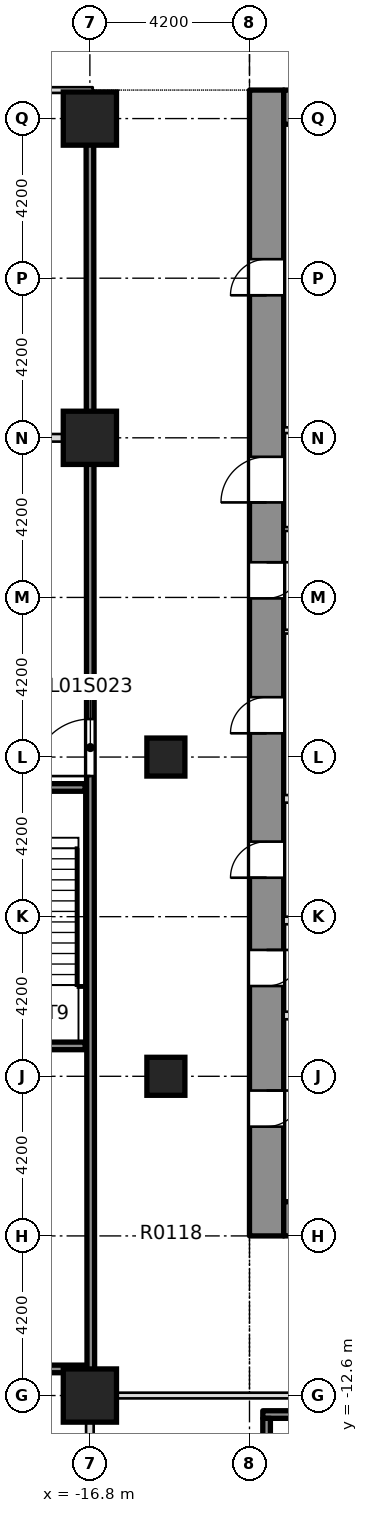
"""IFC4 building model, lengths in metres.
Left out: names, types, materials, properties, quantities, classifications, styles, units other than length and angle.
Written with IfcOpenShell. Run it as: python <this file> out.ifc"""

import sys

from ifc_helpers import new_model, si_unit, direction, frame, frame_2d, origin, origin_2d, place, context, subcontext, project, spatial, rectangle, extrude, element, fill, save


model = new_model("IFC4")
c1 = context("Model", 3, precision=1e-05, world=origin(), true_north=direction((0.0, 1.0)))
c2 = subcontext(c1, "Body", "Model", "MODEL_VIEW")
j1 = project(units=[si_unit("LENGTHUNIT", "METRE"), si_unit("PLANEANGLEUNIT", "RADIAN")], contexts=[c1])
p1 = place(None, origin())
s1 = spatial("IfcSite", under=j1, at=p1, CompositionType="ELEMENT")
p2 = place(p1, origin())
s2 = spatial("IfcBuilding", under=s1, at=p2, CompositionType="ELEMENT")
p3 = place(p2, frame((0.0, 0.0, 7.5)))
s3 = spatial("IfcBuildingStorey", under=s2, at=p3, CompositionType="ELEMENT", Elevation=7.5)
p4 = place(p3, frame((-12.15, -8.4, -0.4), z_axis=(0.0, 0.0, 1.0), x_axis=(0.0, 1.0, 0.0)))
e1 = element("IfcWall", 1, at=p4, inside=s3, PredefinedType="SHEAR", context=c2, shape_type="SweptSolid", body=[
    extrude(rectangle(XDim=30.15, YDim=0.9, at=frame_2d((15.075, 0.0))), origin(), (0.0, 0.0, 1.0), 5.0),
])
p5 = place(p4, frame((2.875, 0.0, 0.4)))
e2 = element("IfcOpeningElement", 2, at=p5, cuts=e1, PredefinedType="OPENING", context=c2, shape_type="SweptSolid", body=[
    extrude(rectangle(XDim=0.95, YDim=2.1, at=frame_2d((0.475, 1.05))), frame((0.0, 0.46, 0.0), z_axis=(0.0, -1.0, 0.0), x_axis=(1.0, 0.0, 0.0)), (0.0, 0.0, 1.0), 0.92),
])
p6 = place(p4, frame((6.575, 0.0, 0.4)))
e3 = element("IfcOpeningElement", 3, at=p6, cuts=e1, PredefinedType="OPENING", context=c2, shape_type="SweptSolid", body=[
    extrude(rectangle(XDim=0.95, YDim=2.1, at=frame_2d((0.475, 1.05))), frame((0.0, 0.46, 0.0), z_axis=(0.0, -1.0, 0.0), x_axis=(1.0, 0.0, 0.0)), (0.0, 0.0, 1.0), 0.92),
])
p7 = place(p4, frame((9.425, 0.0, 0.4)))
e4 = element("IfcOpeningElement", 4, at=p7, cuts=e1, PredefinedType="OPENING", context=c2, shape_type="SweptSolid", body=[
    extrude(rectangle(XDim=0.95, YDim=2.1, at=frame_2d((0.475, 1.05))), frame((0.0, 0.46, 0.0), z_axis=(0.0, -1.0, 0.0), x_axis=(1.0, 0.0, 0.0)), (0.0, 0.0, 1.0), 0.92),
])
p8 = place(p4, frame((13.225, 0.0, 0.4)))
e5 = element("IfcOpeningElement", 5, at=p8, cuts=e1, PredefinedType="OPENING", context=c2, shape_type="SweptSolid", body=[
    extrude(rectangle(XDim=0.95, YDim=2.1, at=frame_2d((0.475, 1.05))), frame((0.0, 0.46, 0.0), z_axis=(0.0, -1.0, 0.0), x_axis=(1.0, 0.0, 0.0)), (0.0, 0.0, 1.0), 0.92),
])
p9 = place(p4, frame((16.775, 0.0, 0.4)))
e6 = element("IfcOpeningElement", 6, at=p9, cuts=e1, PredefinedType="OPENING", context=c2, shape_type="SweptSolid", body=[
    extrude(rectangle(XDim=0.95, YDim=2.1, at=frame_2d((0.475, 1.05))), frame((0.0, 0.46, 0.0), z_axis=(0.0, -1.0, 0.0), x_axis=(1.0, 0.0, 0.0)), (0.0, 0.0, 1.0), 0.92),
])
p10 = place(p4, frame((24.75, 0.0, 0.4)))
e7 = element("IfcOpeningElement", 7, at=p10, cuts=e1, PredefinedType="OPENING", context=c2, shape_type="SweptSolid", body=[
    extrude(rectangle(XDim=0.95, YDim=2.1, at=frame_2d((0.475, 1.05))), frame((0.0, 0.46, 0.0), z_axis=(0.0, -1.0, 0.0), x_axis=(1.0, 0.0, 0.0)), (0.0, 0.0, 1.0), 0.92),
])
p11 = place(p4, frame((19.3, 0.0, 0.4)))
e8 = element("IfcOpeningElement", 8, at=p11, cuts=e1, PredefinedType="OPENING", context=c2, shape_type="SweptSolid", body=[
    extrude(rectangle(XDim=1.2, YDim=2.1, at=frame_2d((0.6, 1.05))), frame((0.0, 0.46, 0.0), z_axis=(0.0, -1.0, 0.0), x_axis=(1.0, 0.0, 0.0)), (0.0, 0.0, 1.0), 0.92),
])
p12 = place(p3, frame((-11.7, -7.95, -0.4), z_axis=(0.0, 0.0, 1.0), x_axis=(1.0, 0.0, 0.0)))
e9 = element("IfcWall", 9, at=p12, inside=s3, PredefinedType="SHEAR", context=c2, shape_type="SweptSolid", body=[
    extrude(rectangle(XDim=23.4, YDim=0.9, at=frame_2d((11.7, 0.0))), origin(), (0.0, 0.0, 1.0), 5.0),
])
p13 = place(p12, frame((6.95, 0.0, 0.4)))
e10 = element("IfcOpeningElement", 10, at=p13, cuts=e9, PredefinedType="OPENING", context=c2, shape_type="SweptSolid", body=[
    extrude(rectangle(XDim=1.8, YDim=2.1, at=frame_2d((0.9, 1.05))), frame((0.0, 0.46, 0.0), z_axis=(0.0, -1.0, 0.0), x_axis=(1.0, 0.0, 0.0)), (0.0, 0.0, 1.0), 0.92),
])
p14 = place(p12, frame((14.65, 0.0, 0.4)))
e11 = element("IfcOpeningElement", 11, at=p14, cuts=e9, PredefinedType="OPENING", context=c2, shape_type="SweptSolid", body=[
    extrude(rectangle(XDim=1.8, YDim=2.1, at=frame_2d((0.9, 1.05))), frame((0.0, 0.46, 0.0), z_axis=(0.0, -1.0, 0.0), x_axis=(1.0, 0.0, 0.0)), (0.0, 0.0, 1.0), 0.92),
])
p15 = place(p3, frame((-11.7, 21.3, -0.4), z_axis=(0.0, 0.0, 1.0), x_axis=(1.0, 0.0, 0.0)))
e12 = element("IfcWall", 12, at=p15, inside=s3, PredefinedType="SOLIDWALL", context=c2, shape_type="SweptSolid", body=[
    extrude(rectangle(XDim=23.4, YDim=0.9, at=frame_2d((11.7, 0.0))), origin(), (0.0, 0.0, 1.0), 5.0),
])
for number, where, z_axis, x_axis in (
    (13, (-16.8, -12.6, -0.4), (0.0, 0.0, 1.0), (1.0, 0.0, 0.0)),
    (14, (-16.8, 12.6, -0.4), (0.0, 0.0, 1.0), (1.0, 0.0, 0.0)),
    (15, (-16.8, 21.0, -0.4), (0.0, 0.0, 1.0), (1.0, 0.0, 0.0)),
):
    element("IfcColumn", number, at=place(p3, frame(where, z_axis=z_axis, x_axis=x_axis)), inside=s3, PredefinedType="COLUMN", context=c2, shape_type="SweptSolid", body=[
        extrude(rectangle(XDim=1.4, YDim=1.4, at=origin_2d()), origin(), (0.0, 0.0, 1.0), 5.0),
    ])
for number, where, z_axis, x_axis in (
    (16, (-14.8, -4.2, -0.4), (0.0, 0.0, 1.0), (1.0, 0.0, 0.0)),
    (17, (-14.8, 4.2, -0.4), (0.0, 0.0, 1.0), (1.0, 0.0, 0.0)),
):
    element("IfcColumn", number, at=place(p3, frame(where, z_axis=z_axis, x_axis=x_axis)), inside=s3, PredefinedType="COLUMN", context=c2, shape_type="SweptSolid", body=[
        extrude(rectangle(XDim=1.0, YDim=1.0, at=origin_2d()), origin(), (0.0, 0.0, 1.0), 5.0),
    ])
p16 = place(p3, frame((-16.9, -12.6, 0.0), z_axis=(0.0, 0.0, 1.0), x_axis=(1.0, 0.0, 0.0)))
e18 = element("IfcWall", 18, at=p16, inside=s3, PredefinedType="PARTITIONING", context=c2, shape_type="SweptSolid", body=[
    extrude(rectangle(XDim=9.625, YDim=0.15, at=frame_2d((4.812, 0.0))), origin(), (0.0, 0.0, 1.0), 4.6),
])
p17 = place(p3, frame((-25.2, -11.9, 0.0), z_axis=(0.0, 0.0, 1.0), x_axis=(1.0, 0.0, 0.0)))
e19 = element("IfcWall", 19, at=p17, inside=s3, PredefinedType="SOLIDWALL", context=c2, shape_type="SweptSolid", body=[
    extrude(rectangle(XDim=8.325, YDim=0.2, at=frame_2d((4.163, 0.0))), origin(), (0.0, 0.0, 1.0), 4.6),
])
p18 = place(p3, frame((-34.15, 21.75, 0.0), z_axis=(0.0, 0.0, 1.0), x_axis=(1.0, 0.0, 0.0)))
e20 = element("IfcWall", 20, at=p18, inside=s3, PredefinedType="PARTITIONING", context=c2, shape_type="SweptSolid", body=[
    extrude(rectangle(XDim=17.425, YDim=0.15, at=frame_2d((8.712, 0.0))), origin(), (0.0, 0.0, 1.0), 4.6),
])
p19 = place(p18, frame((3.7, 0.0, 0.0)))
e21 = element("IfcOpeningElement", 21, at=p19, cuts=e20, PredefinedType="OPENING", context=c2, shape_type="SweptSolid", body=[
    extrude(rectangle(XDim=1.2, YDim=2.1, at=frame_2d((0.6, 1.05))), frame((0.0, 0.085, 0.0), z_axis=(0.0, -1.0, 0.0), x_axis=(1.0, 0.0, 0.0)), (0.0, 0.0, 1.0), 0.17),
])
p20 = place(p18, frame((9.95, 0.0, 0.0)))
e22 = element("IfcOpeningElement", 22, at=p20, cuts=e20, PredefinedType="OPENING", context=c2, shape_type="SweptSolid", body=[
    extrude(rectangle(XDim=1.5, YDim=2.1, at=frame_2d((0.75, 1.05))), frame((0.0, 0.085, 0.0), z_axis=(0.0, -1.0, 0.0), x_axis=(1.0, 0.0, 0.0)), (0.0, 0.0, 1.0), 0.17),
])
p21 = place(p18, frame((14.325, 0.0, 0.0)))
e23 = element("IfcOpeningElement", 23, at=p21, cuts=e20, PredefinedType="OPENING", context=c2, shape_type="SweptSolid", body=[
    extrude(rectangle(XDim=1.5, YDim=2.1, at=frame_2d((0.75, 1.05))), frame((0.0, 0.085, 0.0), z_axis=(0.0, -1.0, 0.0), x_axis=(1.0, 0.0, 0.0)), (0.0, 0.0, 1.0), 0.17),
])
p22 = place(p3, frame((-16.8, -18.125, 0.0), z_axis=(0.0, 0.0, 1.0), x_axis=(0.0, 1.0, 0.0)))
e24 = element("IfcWall", 24, at=p22, inside=s3, PredefinedType="PARTITIONING", context=c2, shape_type="SweptSolid", body=[
    extrude(rectangle(XDim=5.45, YDim=0.2, at=frame_2d((2.725, 0.0))), origin(), (0.0, 0.0, 1.0), 4.6),
])
p23 = place(p3, frame((-16.775, -12.525, 0.0), z_axis=(0.0, 0.0, 1.0), x_axis=(-0.000727609751, 0.999999735292, 0.0)))
e25 = element("IfcWall", 25, at=p23, inside=s3, PredefinedType="SOLIDWALL", context=c2, shape_type="SweptSolid", body=[
    extrude(rectangle(XDim=34.225, YDim=0.2, at=frame_2d((17.112, 0.0))), origin(), (0.0, 0.0, 1.0), 4.6),
])
p24 = place(p23, frame((16.225, 0.0, 0.0)))
e26 = element("IfcOpeningElement", 26, at=p24, cuts=e25, PredefinedType="OPENING", context=c2, shape_type="SweptSolid", body=[
    extrude(rectangle(XDim=1.5, YDim=2.1, at=frame_2d((0.75, 1.05))), frame((0.0, 0.11, 0.0), z_axis=(0.0, -1.0, 0.0), x_axis=(1.0, 0.0, 0.0)), (0.0, 0.0, 1.0), 0.22),
])
for number, where, z_axis, x_axis in (
    (27, (-11.699, -2.6, 0.0), (0.0, 0.0, 1.0), (1.0, 0.0, 0.0)),
    (28, (-11.699, -0.1, 0.0), (0.0, 0.0, 1.0), (1.0, 0.0, 0.0)),
    (29, (-11.699, 3.1, 0.0), (0.0, 0.0, 1.0), (1.0, 0.0, 0.0)),
):
    element("IfcWall", number, at=place(p3, frame(where, z_axis=z_axis, x_axis=x_axis)), inside=s3, PredefinedType="PARTITIONING", context=c2, shape_type="SweptSolid", body=[
        extrude(rectangle(XDim=2.848, YDim=0.2, at=frame_2d((1.424, 0.0))), origin(), (0.0, 0.0, 1.0), 4.6),
    ])
for number, where, z_axis, x_axis in (
    (30, (-11.699, 7.5, 0.0), (0.0, 0.0, 1.0), (1.0, 0.0, 0.0)),
    (31, (-11.699, 10.2, 0.0), (0.0, 0.0, 1.0), (1.0, 0.0, 0.0)),
):
    element("IfcWall", number, at=place(p3, frame(where, z_axis=z_axis, x_axis=x_axis)), inside=s3, PredefinedType="PARTITIONING", context=c2, shape_type="SweptSolid", body=[
        extrude(rectangle(XDim=2.848, YDim=0.1, at=frame_2d((1.424, 0.0))), origin(), (0.0, 0.0, 1.0), 4.6),
    ])
p25 = place(p3, frame((-11.699, 12.8, 0.0), z_axis=(0.0, 0.0, 1.0), x_axis=(1.0, 0.0, 0.0)))
e32 = element("IfcWall", 32, at=p25, inside=s3, PredefinedType="PARTITIONING", context=c2, shape_type="SweptSolid", body=[
    extrude(rectangle(XDim=2.848, YDim=0.15, at=frame_2d((1.424, 0.0))), origin(), (0.0, 0.0, 1.0), 4.6),
])
p26 = place(p3, frame((-12.25, -13.1, 0.0), z_axis=(0.0, 0.0, 1.0), x_axis=(1.0, 0.0, 0.0)))
e33 = element("IfcWall", 33, at=p26, inside=s3, PredefinedType="SOLIDWALL", context=c2, shape_type="SweptSolid", body=[
    extrude(rectangle(XDim=3.7, YDim=0.2, at=frame_2d((1.85, 0.0))), origin(), (0.0, 0.0, 1.0), 4.6),
])
p27 = place(p3, frame((-12.15, -19.8, 0.0), z_axis=(0.0, 0.0, 1.0), x_axis=(0.0, 1.0, 0.0)))
e34 = element("IfcWall", 34, at=p27, inside=s3, PredefinedType="SOLIDWALL", context=c2, shape_type="SweptSolid", body=[
    extrude(rectangle(XDim=6.6, YDim=0.2, at=frame_2d((3.3, 0.0))), origin(), (0.0, 0.0, 1.0), 4.6),
])
for number, where, z_axis, x_axis in (
    (35, (-20.45, -3.4, 0.0), (0.0, 0.0, 1.0), (1.0, 0.0, 0.0)),
    (36, (-20.45, 3.4, 0.0), (0.0, 0.0, 1.0), (1.0, 0.0, 0.0)),
):
    element("IfcWall", number, at=place(p3, frame(where, z_axis=z_axis, x_axis=x_axis)), inside=s3, PredefinedType="SOLIDWALL", context=c2, shape_type="SweptSolid", body=[
        extrude(rectangle(XDim=3.525, YDim=0.2, at=frame_2d((1.762, 0.0))), origin(), (0.0, 0.0, 1.0), 4.6),
    ])
p28 = place(p3, frame((-25.9, 12.6, 0.0), z_axis=(0.0, 0.0, 1.0), x_axis=(1.0, 0.0, 0.0)))
e37 = element("IfcWall", 37, at=p28, inside=s3, PredefinedType="PARTITIONING", context=c2, shape_type="SweptSolid", body=[
    extrude(rectangle(XDim=9.025, YDim=0.2, at=frame_2d((4.512, 0.0))), origin(), (0.0, 0.0, 1.0), 4.6),
])
p29 = place(p24, origin())
e38 = element("IfcDoor", 38, at=p29, inside=s3, OperationType="DOUBLE_DOOR_SINGLE_SWING", PredefinedType="DOOR", context=c2, shape_type="SweptSolid", body=[
    extrude(rectangle(XDim=1.5, YDim=2.1, at=frame_2d((0.75, 1.05))), frame((0.0, 0.025, 0.0), z_axis=(0.0, -1.0, 0.0), x_axis=(1.0, 0.0, 0.0)), (0.0, 0.0, 1.0), 0.05),
])
fill(e26, e38)
p30 = place(p5, origin())
e39 = element("IfcDoor", 39, at=p30, inside=s3, OperationType="SINGLE_SWING_LEFT", PredefinedType="DOOR", context=c2, shape_type="SweptSolid", body=[
    extrude(rectangle(XDim=0.95, YDim=2.1, at=frame_2d((0.475, 1.05))), frame((0.0, 0.025, 0.0), z_axis=(0.0, -1.0, 0.0), x_axis=(1.0, 0.0, 0.0)), (0.0, 0.0, 1.0), 0.05),
])
fill(e2, e39)
p31 = place(p6, origin())
e40 = element("IfcDoor", 40, at=p31, inside=s3, OperationType="SINGLE_SWING_LEFT", PredefinedType="DOOR", context=c2, shape_type="SweptSolid", body=[
    extrude(rectangle(XDim=0.95, YDim=2.1, at=frame_2d((0.475, 1.05))), frame((0.0, 0.025, 0.0), z_axis=(0.0, -1.0, 0.0), x_axis=(1.0, 0.0, 0.0)), (0.0, 0.0, 1.0), 0.05),
])
fill(e3, e40)
p32 = place(p7, origin())
e41 = element("IfcDoor", 41, at=p32, inside=s3, OperationType="SINGLE_SWING_LEFT", PredefinedType="DOOR", context=c2, shape_type="SweptSolid", body=[
    extrude(rectangle(XDim=0.95, YDim=2.1, at=frame_2d((0.475, 1.05))), frame((0.0, 0.025, 0.0), z_axis=(0.0, -1.0, 0.0), x_axis=(1.0, 0.0, 0.0)), (0.0, 0.0, 1.0), 0.05),
])
fill(e4, e41)
p33 = place(p8, origin())
e42 = element("IfcDoor", 42, at=p33, inside=s3, OperationType="SINGLE_SWING_LEFT", PredefinedType="DOOR", context=c2, shape_type="SweptSolid", body=[
    extrude(rectangle(XDim=0.95, YDim=2.1, at=frame_2d((0.475, 1.05))), frame((0.0, 0.025, 0.0), z_axis=(0.0, -1.0, 0.0), x_axis=(1.0, 0.0, 0.0)), (0.0, 0.0, 1.0), 0.05),
])
fill(e5, e42)
p34 = place(p9, origin())
e43 = element("IfcDoor", 43, at=p34, inside=s3, OperationType="SINGLE_SWING_LEFT", PredefinedType="DOOR", context=c2, shape_type="SweptSolid", body=[
    extrude(rectangle(XDim=0.95, YDim=2.1, at=frame_2d((0.475, 1.05))), frame((0.0, 0.025, 0.0), z_axis=(0.0, -1.0, 0.0), x_axis=(1.0, 0.0, 0.0)), (0.0, 0.0, 1.0), 0.05),
])
fill(e6, e43)
p35 = place(p10, origin())
e44 = element("IfcDoor", 44, at=p35, inside=s3, OperationType="SINGLE_SWING_LEFT", PredefinedType="DOOR", context=c2, shape_type="SweptSolid", body=[
    extrude(rectangle(XDim=0.95, YDim=2.1, at=frame_2d((0.475, 1.05))), frame((0.0, 0.025, 0.0), z_axis=(0.0, -1.0, 0.0), x_axis=(1.0, 0.0, 0.0)), (0.0, 0.0, 1.0), 0.05),
])
fill(e7, e44)
p36 = place(p11, origin())
e45 = element("IfcDoor", 45, at=p36, inside=s3, OperationType="SINGLE_SWING_LEFT", PredefinedType="DOOR", context=c2, shape_type="SweptSolid", body=[
    extrude(rectangle(XDim=1.2, YDim=2.1, at=frame_2d((0.6, 1.05))), frame((0.0, 0.025, 0.0), z_axis=(0.0, -1.0, 0.0), x_axis=(1.0, 0.0, 0.0)), (0.0, 0.0, 1.0), 0.05),
])
fill(e8, e45)
save(model, sys.argv[1])
